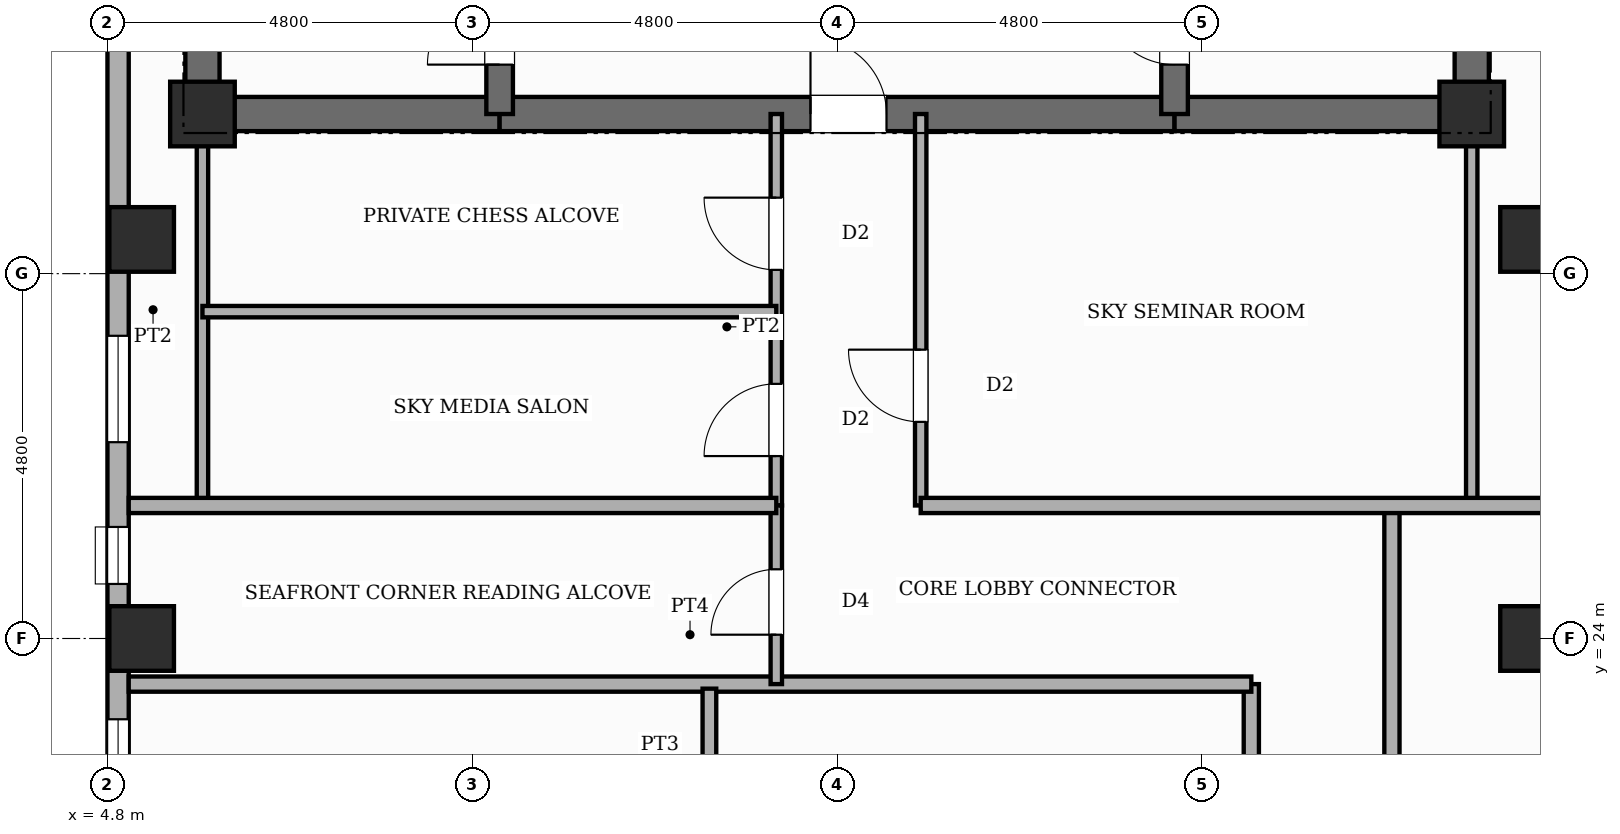
"""IFC4 building model, lengths in metres.
Left out: names, types, materials, properties, quantities, classifications, styles, units other than length and angle.
Written with IfcOpenShell. Run it as: python <this file> out.ifc"""

import sys

from ifc_helpers import new_model, si_unit, direction, frame, frame_2d, origin, origin_2d, place, context, subcontext, project, spatial, rectangle, extrude, element, fill, save


model = new_model("IFC4")
c1 = context("Model", 3, precision=1e-05, world=origin(), true_north=direction((0.0, 1.0)))
c2 = subcontext(c1, "Body", "Model", "MODEL_VIEW")
j1 = project(units=[si_unit("LENGTHUNIT", "METRE"), si_unit("PLANEANGLEUNIT", "RADIAN")], contexts=[c1])
p1 = place(None, origin())
s1 = spatial("IfcSite", under=j1, at=p1, CompositionType="ELEMENT")
p2 = place(p1, origin())
s2 = spatial("IfcBuilding", under=s1, at=p2, CompositionType="ELEMENT")
p3 = place(p2, frame((0.0, 0.0, 236.2)))
s3 = spatial("IfcBuildingStorey", under=s2, at=p3, CompositionType="ELEMENT", Elevation=236.2)
p4 = place(p3, frame((6.05, 30.675, 0.0), z_axis=(0.0, 0.0, 1.0), x_axis=(0.0, 1.0, 0.0)))
e1 = element("IfcWall", 1, at=p4, inside=s3, PredefinedType="SHEAR", context=c2, shape_type="SweptSolid", body=[
    extrude(rectangle(XDim=15.35, YDim=0.45, at=frame_2d((7.675, 0.0))), origin(), (0.0, 0.0, 1.0), 3.6),
])
p5 = place(p4, frame((10.675, 0.0, 0.0)))
e2 = element("IfcOpeningElement", 2, at=p5, cuts=e1, PredefinedType="OPENING", context=c2, shape_type="SweptSolid", body=[
    extrude(rectangle(XDim=0.95, YDim=2.15, at=frame_2d((0.475, 1.075))), frame((0.0, 0.235, 0.0), z_axis=(0.0, -1.0, 0.0), x_axis=(1.0, 0.0, 0.0)), (0.0, 0.0, 1.0), 0.47),
])
p6 = place(p3, frame((22.75, 30.675, 0.0), z_axis=(0.0, 0.0, 1.0), x_axis=(0.0, 1.0, 0.0)))
e3 = element("IfcWall", 3, at=p6, inside=s3, PredefinedType="SHEAR", context=c2, shape_type="SweptSolid", body=[
    extrude(rectangle(XDim=15.35, YDim=0.45, at=frame_2d((7.675, 0.0))), origin(), (0.0, 0.0, 1.0), 3.6),
])
p7 = place(p6, frame((10.675, 0.0, 0.0)))
e4 = element("IfcOpeningElement", 4, at=p7, cuts=e3, PredefinedType="OPENING", context=c2, shape_type="SweptSolid", body=[
    extrude(rectangle(XDim=1.0, YDim=2.15, at=frame_2d((0.5, 1.075))), frame((0.0, 0.235, 0.0), z_axis=(0.0, -1.0, 0.0), x_axis=(1.0, 0.0, 0.0)), (0.0, 0.0, 1.0), 0.47),
])
p8 = place(p3, frame((6.05, 30.9, 0.0), z_axis=(0.0, 0.0, 1.0), x_axis=(1.0, 0.0, 0.0)))
e5 = element("IfcWall", 5, at=p8, inside=s3, PredefinedType="SHEAR", context=c2, shape_type="SweptSolid", body=[
    extrude(rectangle(XDim=3.91, YDim=0.45, at=frame_2d((1.955, 0.0))), origin(), (0.0, 0.0, 1.0), 3.6),
])
p9 = place(p3, frame((9.96, 30.9, 0.0), z_axis=(0.0, 0.0, 1.0), x_axis=(1.0, 0.0, 0.0)))
e6 = element("IfcWall", 6, at=p9, inside=s3, PredefinedType="SHEAR", context=c2, shape_type="SweptSolid", body=[
    extrude(rectangle(XDim=8.88, YDim=0.45, at=frame_2d((4.44, 0.0))), origin(), (0.0, 0.0, 1.0), 3.6),
])
p10 = place(p9, frame((4.09, 0.0, 0.0)))
e7 = element("IfcOpeningElement", 7, at=p10, cuts=e6, PredefinedType="OPENING", context=c2, shape_type="SweptSolid", body=[
    extrude(rectangle(XDim=1.0, YDim=2.15, at=frame_2d((0.5, 1.075))), frame((0.0, 0.235, 0.0), z_axis=(0.0, -1.0, 0.0), x_axis=(1.0, 0.0, 0.0)), (0.0, 0.0, 1.0), 0.47),
])
p11 = place(p3, frame((18.84, 30.9, 0.0), z_axis=(0.0, 0.0, 1.0), x_axis=(1.0, 0.0, 0.0)))
e8 = element("IfcWall", 8, at=p11, inside=s3, PredefinedType="SHEAR", context=c2, shape_type="SweptSolid", body=[
    extrude(rectangle(XDim=3.91, YDim=0.45, at=frame_2d((1.955, 0.0))), origin(), (0.0, 0.0, 1.0), 3.6),
])
p12 = place(p3, frame((9.96, 30.9, 0.0), z_axis=(0.0, 0.0, 1.0), x_axis=(0.0, 1.0, 0.0)))
e9 = element("IfcWall", 9, at=p12, inside=s3, PredefinedType="SHEAR", context=c2, shape_type="SweptSolid", body=[
    extrude(rectangle(XDim=14.9, YDim=0.35, at=frame_2d((7.45, 0.0))), origin(), (0.0, 0.0, 1.0), 3.6),
])
p13 = place(p12, frame((0.65, 0.0, 0.0)))
e10 = element("IfcOpeningElement", 10, at=p13, cuts=e9, PredefinedType="OPENING", context=c2, shape_type="SweptSolid", body=[
    extrude(rectangle(XDim=0.95, YDim=2.1, at=frame_2d((0.475, 1.05))), frame((0.0, 0.185, 0.0), z_axis=(0.0, -1.0, 0.0), x_axis=(1.0, 0.0, 0.0)), (0.0, 0.0, 1.0), 0.37),
])
p14 = place(p12, frame((10.45, 0.0, 0.0)))
e11 = element("IfcOpeningElement", 11, at=p14, cuts=e9, PredefinedType="OPENING", context=c2, shape_type="SweptSolid", body=[
    extrude(rectangle(XDim=1.0, YDim=2.15, at=frame_2d((0.5, 1.075))), frame((0.0, 0.185, 0.0), z_axis=(0.0, -1.0, 0.0), x_axis=(1.0, 0.0, 0.0)), (0.0, 0.0, 1.0), 0.37),
])
p15 = place(p3, frame((18.84, 30.9, 0.0), z_axis=(0.0, 0.0, 1.0), x_axis=(0.0, 1.0, 0.0)))
e12 = element("IfcWall", 12, at=p15, inside=s3, PredefinedType="SHEAR", context=c2, shape_type="SweptSolid", body=[
    extrude(rectangle(XDim=14.9, YDim=0.35, at=frame_2d((7.45, 0.0))), origin(), (0.0, 0.0, 1.0), 3.6),
])
p16 = place(p15, frame((0.65, 0.0, 0.0)))
e13 = element("IfcOpeningElement", 13, at=p16, cuts=e12, PredefinedType="OPENING", context=c2, shape_type="SweptSolid", body=[
    extrude(rectangle(XDim=0.95, YDim=2.1, at=frame_2d((0.475, 1.05))), frame((0.0, 0.185, 0.0), z_axis=(0.0, -1.0, 0.0), x_axis=(1.0, 0.0, 0.0)), (0.0, 0.0, 1.0), 0.37),
])
p17 = place(p15, frame((10.45, 0.0, 0.0)))
e14 = element("IfcOpeningElement", 14, at=p17, cuts=e12, PredefinedType="OPENING", context=c2, shape_type="SweptSolid", body=[
    extrude(rectangle(XDim=1.0, YDim=2.15, at=frame_2d((0.5, 1.075))), frame((0.0, 0.185, 0.0), z_axis=(0.0, -1.0, 0.0), x_axis=(1.0, 0.0, 0.0)), (0.0, 0.0, 1.0), 0.37),
])
for number, where, z_axis, x_axis in (
    (15, (5.25, 24.0, 0.0), (0.0, 0.0, 1.0), (1.0, 0.0, 0.0)),
    (16, (5.25, 29.25, 0.0), (0.0, 0.0, 1.0), (1.0, 0.0, 0.0)),
    (17, (6.05, 30.9, 0.0), (0.0, 0.0, 1.0), (1.0, 0.0, 0.0)),
    (18, (22.75, 30.9, 0.0), (0.0, 0.0, 1.0), (1.0, 0.0, 0.0)),
    (19, (23.55, 24.0, 0.0), (0.0, 0.0, 1.0), (1.0, 0.0, 0.0)),
    (20, (23.55, 29.25, 0.0), (0.0, 0.0, 1.0), (1.0, 0.0, 0.0)),
):
    element("IfcColumn", number, at=place(p3, frame(where, z_axis=z_axis, x_axis=x_axis)), inside=s3, PredefinedType="COLUMN", context=c2, shape_type="SweptSolid", body=[
        extrude(rectangle(XDim=0.85, YDim=0.85, at=origin_2d()), origin(), (0.0, 0.0, 1.0), 3.6),
    ])
p18 = place(p3, frame((4.94, 12.0, 0.0), z_axis=(0.0, 0.0, 1.0), x_axis=(0.0, 1.0, 0.0)))
e21 = element("IfcWall", 21, at=p18, inside=s3, PredefinedType="STANDARD", context=c2, shape_type="SweptSolid", body=[
    extrude(rectangle(XDim=33.6, YDim=0.28, at=frame_2d((16.8, 0.0))), origin(), (0.0, 0.0, 1.0), 2.6),
])
p19 = place(p18, frame((4.5, 0.0, 0.0)))
e22 = element("IfcOpeningElement", 22, at=p19, cuts=e21, PredefinedType="OPENING", context=c2, shape_type="SweptSolid", body=[
    extrude(rectangle(XDim=1.1, YDim=2.15, at=frame_2d((0.55, 1.075))), frame((0.0, 0.15, 0.0), z_axis=(0.0, -1.0, 0.0), x_axis=(1.0, 0.0, 0.0)), (0.0, 0.0, 1.0), 0.3),
])
p20 = place(p18, frame((3.153, 0.0, 0.45)))
e23 = element("IfcOpeningElement", 23, at=p20, cuts=e21, PredefinedType="OPENING", context=c2, shape_type="SweptSolid", body=[
    extrude(rectangle(XDim=0.75, YDim=1.8, at=frame_2d((0.375, 0.9))), frame((0.0, 0.15, 0.0), z_axis=(0.0, -1.0, 0.0), x_axis=(1.0, 0.0, 0.0)), (0.0, 0.0, 1.0), 0.3),
])
p21 = place(p18, frame((7.915, 0.0, 0.45)))
e24 = element("IfcOpeningElement", 24, at=p21, cuts=e21, PredefinedType="OPENING", context=c2, shape_type="SweptSolid", body=[
    extrude(rectangle(XDim=0.95, YDim=1.8, at=frame_2d((0.475, 0.9))), frame((0.0, 0.15, 0.0), z_axis=(0.0, -1.0, 0.0), x_axis=(1.0, 0.0, 0.0)), (0.0, 0.0, 1.0), 0.3),
])
p22 = place(p18, frame((0.49, 0.0, 0.45)))
e25 = element("IfcOpeningElement", 25, at=p22, cuts=e21, PredefinedType="OPENING", context=c2, shape_type="SweptSolid", body=[
    extrude(rectangle(XDim=0.95, YDim=1.8, at=frame_2d((0.475, 0.9))), frame((0.0, 0.15, 0.0), z_axis=(0.0, -1.0, 0.0), x_axis=(1.0, 0.0, 0.0)), (0.0, 0.0, 1.0), 0.3),
])
p23 = place(p18, frame((9.537, 0.0, 0.65)))
e26 = element("IfcOpeningElement", 26, at=p23, cuts=e21, PredefinedType="OPENING", context=c2, shape_type="SweptSolid", body=[
    extrude(rectangle(XDim=1.4, YDim=1.1, at=frame_2d((0.7, 0.55))), frame((0.0, 0.15, 0.0), z_axis=(0.0, -1.0, 0.0), x_axis=(1.0, 0.0, 0.0)), (0.0, 0.0, 1.0), 0.3),
])
p24 = place(p18, frame((14.583, 0.0, 0.65)))
e27 = element("IfcOpeningElement", 27, at=p24, cuts=e21, PredefinedType="OPENING", context=c2, shape_type="SweptSolid", body=[
    extrude(rectangle(XDim=1.4, YDim=1.1, at=frame_2d((0.7, 0.55))), frame((0.0, 0.15, 0.0), z_axis=(0.0, -1.0, 0.0), x_axis=(1.0, 0.0, 0.0)), (0.0, 0.0, 1.0), 0.3),
])
p25 = place(p18, frame((12.718, 0.0, 0.45)))
e28 = element("IfcOpeningElement", 28, at=p25, cuts=e21, PredefinedType="OPENING", context=c2, shape_type="SweptSolid", body=[
    extrude(rectangle(XDim=0.75, YDim=1.8, at=frame_2d((0.375, 0.9))), frame((0.0, 0.15, 0.0), z_axis=(0.0, -1.0, 0.0), x_axis=(1.0, 0.0, 0.0)), (0.0, 0.0, 1.0), 0.3),
])
p26 = place(p3, frame((13.6, 25.75, 0.0), z_axis=(0.0, 0.0, 1.0), x_axis=(0.0, 1.0, 0.0)))
e29 = element("IfcWall", 29, at=p26, inside=s3, PredefinedType="PARTITIONING", context=c2, shape_type="SweptSolid", body=[
    extrude(rectangle(XDim=5.15, YDim=0.15, at=frame_2d((2.575, 0.0))), origin(), (0.0, 0.0, 1.0), 3.32),
])
p27 = place(p26, frame((0.65, 0.0, 0.0)))
e30 = element("IfcOpeningElement", 30, at=p27, cuts=e29, PredefinedType="OPENING", context=c2, shape_type="SweptSolid", body=[
    extrude(rectangle(XDim=0.95, YDim=2.15, at=frame_2d((0.475, 1.075))), frame((0.0, 0.085, 0.0), z_axis=(0.0, -1.0, 0.0), x_axis=(1.0, 0.0, 0.0)), (0.0, 0.0, 1.0), 0.17),
])
p28 = place(p26, frame((3.1, 0.0, 0.0)))
e31 = element("IfcOpeningElement", 31, at=p28, cuts=e29, PredefinedType="OPENING", context=c2, shape_type="SweptSolid", body=[
    extrude(rectangle(XDim=0.95, YDim=2.15, at=frame_2d((0.475, 1.075))), frame((0.0, 0.085, 0.0), z_axis=(0.0, -1.0, 0.0), x_axis=(1.0, 0.0, 0.0)), (0.0, 0.0, 1.0), 0.17),
])
p29 = place(p3, frame((15.5, 25.75, 0.0), z_axis=(0.0, 0.0, 1.0), x_axis=(0.0, 1.0, 0.0)))
e32 = element("IfcWall", 32, at=p29, inside=s3, PredefinedType="PARTITIONING", context=c2, shape_type="SweptSolid", body=[
    extrude(rectangle(XDim=5.15, YDim=0.15, at=frame_2d((2.575, 0.0))), origin(), (0.0, 0.0, 1.0), 3.32),
])
p30 = place(p29, frame((1.1, 0.0, 0.0)))
e33 = element("IfcOpeningElement", 33, at=p30, cuts=e32, PredefinedType="OPENING", context=c2, shape_type="SweptSolid", body=[
    extrude(rectangle(XDim=0.95, YDim=2.15, at=frame_2d((0.475, 1.075))), frame((0.0, 0.085, 0.0), z_axis=(0.0, -1.0, 0.0), x_axis=(1.0, 0.0, 0.0)), (0.0, 0.0, 1.0), 0.17),
])
for number, where, z_axis, x_axis in (
    (34, (6.05, 25.75, 0.0), (0.0, 0.0, 1.0), (0.0, 1.0, 0.0)),
    (35, (22.75, 25.75, 0.0), (0.0, 0.0, 1.0), (0.0, 1.0, 0.0)),
):
    element("IfcWall", number, at=place(p3, frame(where, z_axis=z_axis, x_axis=x_axis)), inside=s3, PredefinedType="PARTITIONING", context=c2, shape_type="SweptSolid", body=[
        extrude(rectangle(XDim=5.15, YDim=0.15, at=frame_2d((2.575, 0.0))), origin(), (0.0, 0.0, 1.0), 3.32),
    ])
p31 = place(p3, frame((6.05, 28.3, 0.0), z_axis=(0.0, 0.0, 1.0), x_axis=(1.0, 0.0, 0.0)))
e36 = element("IfcWall", 36, at=p31, inside=s3, PredefinedType="PARTITIONING", context=c2, shape_type="SweptSolid", body=[
    extrude(rectangle(XDim=7.55, YDim=0.15, at=frame_2d((3.775, 0.0))), origin(), (0.0, 0.0, 1.0), 3.32),
])
p32 = place(p3, frame((19.85, 9.88, 0.0), z_axis=(0.0, 0.0, 1.0), x_axis=(0.0, 1.0, 0.0)))
e37 = element("IfcWall", 37, at=p32, inside=s3, PredefinedType="PARTITIONING", context=c2, shape_type="SweptSolid", body=[
    extrude(rectangle(XDim=13.52, YDim=0.2, at=frame_2d((6.76, 0.0))), origin(), (0.0, 0.0, 1.0), 3.32),
])
p33 = place(p32, frame((0.935, 0.0, 0.0)))
e38 = element("IfcOpeningElement", 38, at=p33, cuts=e37, PredefinedType="OPENING", context=c2, shape_type="SweptSolid", body=[
    extrude(rectangle(XDim=0.98, YDim=2.18, at=frame_2d((0.49, 1.09))), frame((0.0, 0.11, 0.0), z_axis=(0.0, -1.0, 0.0), x_axis=(1.0, 0.0, 0.0)), (0.0, 0.0, 1.0), 0.22),
])
p34 = place(p32, frame((4.655, 0.0, 0.0)))
e39 = element("IfcOpeningElement", 39, at=p34, cuts=e37, PredefinedType="OPENING", context=c2, shape_type="SweptSolid", body=[
    extrude(rectangle(XDim=0.98, YDim=2.18, at=frame_2d((0.49, 1.09))), frame((0.0, 0.11, 0.0), z_axis=(0.0, -1.0, 0.0), x_axis=(1.0, 0.0, 0.0)), (0.0, 0.0, 1.0), 0.22),
])
p35 = place(p32, frame((9.117, 0.0, 0.0)))
e40 = element("IfcOpeningElement", 40, at=p35, cuts=e37, PredefinedType="OPENING", context=c2, shape_type="SweptSolid", body=[
    extrude(rectangle(XDim=0.98, YDim=2.18, at=frame_2d((0.49, 1.09))), frame((0.0, 0.11, 0.0), z_axis=(0.0, -1.0, 0.0), x_axis=(1.0, 0.0, 0.0)), (0.0, 0.0, 1.0), 0.22),
])
p36 = place(p3, frame((21.7, 9.92, 0.0), z_axis=(0.0, 0.0, 1.0), x_axis=(0.0, 1.0, 0.0)))
e41 = element("IfcWall", 41, at=p36, inside=s3, PredefinedType="PARTITIONING", context=c2, shape_type="SweptSolid", body=[
    extrude(rectangle(XDim=15.83, YDim=0.2, at=frame_2d((7.915, 0.0))), origin(), (0.0, 0.0, 1.0), 3.32),
])
p37 = place(p36, frame((3.43, 0.0, 0.0)))
e42 = element("IfcOpeningElement", 42, at=p37, cuts=e41, PredefinedType="OPENING", context=c2, shape_type="SweptSolid", body=[
    extrude(rectangle(XDim=0.95, YDim=2.15, at=frame_2d((0.475, 1.075))), frame((0.0, 0.11, 0.0), z_axis=(0.0, -1.0, 0.0), x_axis=(1.0, 0.0, 0.0)), (0.0, 0.0, 1.0), 0.22),
])
p38 = place(p36, frame((11.35, 0.0, 0.0)))
e43 = element("IfcOpeningElement", 43, at=p38, cuts=e41, PredefinedType="OPENING", context=c2, shape_type="SweptSolid", body=[
    extrude(rectangle(XDim=0.95, YDim=2.15, at=frame_2d((0.475, 1.075))), frame((0.0, 0.11, 0.0), z_axis=(0.0, -1.0, 0.0), x_axis=(1.0, 0.0, 0.0)), (0.0, 0.0, 1.0), 0.22),
])
p39 = place(p3, frame((5.08, 23.4, 0.0), z_axis=(0.0, 0.0, 1.0), x_axis=(1.0, 0.0, 0.0)))
e44 = element("IfcWall", 44, at=p39, inside=s3, PredefinedType="PARTITIONING", context=c2, shape_type="SweptSolid", body=[
    extrude(rectangle(XDim=14.77, YDim=0.2, at=frame_2d((7.385, 0.0))), origin(), (0.0, 0.0, 1.0), 3.32),
])
p40 = place(p3, frame((15.5, 25.75, 0.0), z_axis=(0.0, 0.0, 1.0), x_axis=(1.0, 0.0, 0.0)))
e45 = element("IfcWall", 45, at=p40, inside=s3, PredefinedType="PARTITIONING", context=c2, shape_type="SweptSolid", body=[
    extrude(rectangle(XDim=8.22, YDim=0.2, at=frame_2d((4.11, 0.0))), origin(), (0.0, 0.0, 1.0), 3.32),
])
p41 = place(p3, frame((13.6, 23.4, 0.0), z_axis=(0.0, 0.0, 1.0), x_axis=(0.0, 1.0, 0.0)))
e46 = element("IfcWall", 46, at=p41, inside=s3, PredefinedType="PARTITIONING", context=c2, shape_type="SweptSolid", body=[
    extrude(rectangle(XDim=2.35, YDim=0.15, at=frame_2d((1.175, 0.0))), origin(), (0.0, 0.0, 1.0), 3.32),
])
p42 = place(p41, frame((0.65, 0.0, 0.0)))
e47 = element("IfcOpeningElement", 47, at=p42, cuts=e46, PredefinedType="OPENING", context=c2, shape_type="SweptSolid", body=[
    extrude(rectangle(XDim=0.86, YDim=2.1, at=frame_2d((0.43, 1.05))), frame((0.0, 0.085, 0.0), z_axis=(0.0, -1.0, 0.0), x_axis=(1.0, 0.0, 0.0)), (0.0, 0.0, 1.0), 0.17),
])
p43 = place(p3, frame((5.08, 25.75, 0.0), z_axis=(0.0, 0.0, 1.0), x_axis=(1.0, 0.0, 0.0)))
e48 = element("IfcWall", 48, at=p43, inside=s3, PredefinedType="PARTITIONING", context=c2, shape_type="SweptSolid", body=[
    extrude(rectangle(XDim=8.52, YDim=0.2, at=frame_2d((4.26, 0.0))), origin(), (0.0, 0.0, 1.0), 3.32),
])
p44 = place(p3, frame((12.72, 21.134, 0.0), z_axis=(0.0, 0.0, 1.0), x_axis=(0.0, 1.0, 0.0)))
e49 = element("IfcWall", 49, at=p44, inside=s3, PredefinedType="PLUMBINGWALL", context=c2, shape_type="SweptSolid", body=[
    extrude(rectangle(XDim=2.206, YDim=0.18, at=frame_2d((1.103, 0.0))), origin(), (0.0, 0.0, 1.0), 3.32),
])
p45 = place(p23, origin())
e50 = element("IfcWindow", 50, at=p45, inside=s3, PartitioningType="SINGLE_PANEL", PredefinedType="WINDOW", context=c2, shape_type="SweptSolid", body=[
    extrude(rectangle(XDim=1.4, YDim=1.1, at=frame_2d((0.7, 0.55))), frame((0.0, 0.03, 0.0), z_axis=(0.0, -1.0, 0.0), x_axis=(1.0, 0.0, 0.0)), (0.0, 0.0, 1.0), 0.06),
])
fill(e26, e50)
p46 = place(p24, origin())
e51 = element("IfcWindow", 51, at=p46, inside=s3, PartitioningType="SINGLE_PANEL", PredefinedType="WINDOW", context=c2, shape_type="SweptSolid", body=[
    extrude(rectangle(XDim=1.4, YDim=1.1, at=frame_2d((0.7, 0.55))), frame((0.0, 0.03, 0.0), z_axis=(0.0, -1.0, 0.0), x_axis=(1.0, 0.0, 0.0)), (0.0, 0.0, 1.0), 0.06),
])
fill(e27, e51)
p47 = place(p25, origin())
e52 = element("IfcWindow", 52, at=p47, inside=s3, PartitioningType="SINGLE_PANEL", PredefinedType="WINDOW", context=c2, shape_type="SweptSolid", body=[
    extrude(rectangle(XDim=0.75, YDim=1.8, at=frame_2d((0.375, 0.9))), frame((0.0, 0.03, 0.0), z_axis=(0.0, -1.0, 0.0), x_axis=(1.0, 0.0, 0.0)), (0.0, 0.0, 1.0), 0.06),
])
fill(e28, e52)
p48 = place(p13, origin())
e53 = element("IfcDoor", 53, at=p48, inside=s3, OperationType="SINGLE_SWING_LEFT", PredefinedType="DOOR", context=c2, shape_type="SweptSolid", body=[
    extrude(rectangle(XDim=0.95, YDim=2.1, at=frame_2d((0.475, 1.05))), frame((0.0, 0.025, 0.0), z_axis=(0.0, -1.0, 0.0), x_axis=(1.0, 0.0, 0.0)), (0.0, 0.0, 1.0), 0.05),
])
fill(e10, e53)
p49 = place(p16, origin())
e54 = element("IfcDoor", 54, at=p49, inside=s3, OperationType="SINGLE_SWING_RIGHT", PredefinedType="DOOR", context=c2, shape_type="SweptSolid", body=[
    extrude(rectangle(XDim=0.95, YDim=2.1, at=frame_2d((0.475, 1.05))), frame((0.0, 0.025, 0.0), z_axis=(0.0, -1.0, 0.0), x_axis=(1.0, 0.0, 0.0)), (0.0, 0.0, 1.0), 0.05),
])
fill(e13, e54)
p50 = place(p10, origin())
e55 = element("IfcDoor", 55, at=p50, inside=s3, OperationType="SINGLE_SWING_LEFT", PredefinedType="DOOR", context=c2, shape_type="SweptSolid", body=[
    extrude(rectangle(XDim=1.0, YDim=2.15, at=frame_2d((0.5, 1.075))), frame((0.0, 0.025, 0.0), z_axis=(0.0, -1.0, 0.0), x_axis=(1.0, 0.0, 0.0)), (0.0, 0.0, 1.0), 0.05),
])
fill(e7, e55)
p51 = place(p27, origin())
e56 = element("IfcDoor", 56, at=p51, inside=s3, OperationType="SINGLE_SWING_LEFT", PredefinedType="DOOR", context=c2, shape_type="SweptSolid", body=[
    extrude(rectangle(XDim=0.95, YDim=2.15, at=frame_2d((0.475, 1.075))), frame((0.0, 0.025, 0.0), z_axis=(0.0, -1.0, 0.0), x_axis=(1.0, 0.0, 0.0)), (0.0, 0.0, 1.0), 0.05),
])
fill(e30, e56)
p52 = place(p28, origin())
e57 = element("IfcDoor", 57, at=p52, inside=s3, OperationType="SINGLE_SWING_RIGHT", PredefinedType="DOOR", context=c2, shape_type="SweptSolid", body=[
    extrude(rectangle(XDim=0.95, YDim=2.15, at=frame_2d((0.475, 1.075))), frame((0.0, 0.025, 0.0), z_axis=(0.0, -1.0, 0.0), x_axis=(1.0, 0.0, 0.0)), (0.0, 0.0, 1.0), 0.05),
])
fill(e31, e57)
p53 = place(p30, origin())
e58 = element("IfcDoor", 58, at=p53, inside=s3, OperationType="SINGLE_SWING_RIGHT", PredefinedType="DOOR", context=c2, shape_type="SweptSolid", body=[
    extrude(rectangle(XDim=0.95, YDim=2.15, at=frame_2d((0.475, 1.075))), frame((0.0, 0.025, 0.0), z_axis=(0.0, -1.0, 0.0), x_axis=(1.0, 0.0, 0.0)), (0.0, 0.0, 1.0), 0.05),
])
fill(e33, e58)
p54 = place(p42, origin())
e59 = element("IfcDoor", 59, at=p54, inside=s3, OperationType="SINGLE_SWING_LEFT", PredefinedType="DOOR", context=c2, shape_type="SweptSolid", body=[
    extrude(rectangle(XDim=0.86, YDim=2.1, at=frame_2d((0.43, 1.05))), frame((0.0, 0.025, 0.0), z_axis=(0.0, -1.0, 0.0), x_axis=(1.0, 0.0, 0.0)), (0.0, 0.0, 1.0), 0.05),
])
fill(e47, e59)
save(model, sys.argv[1])
